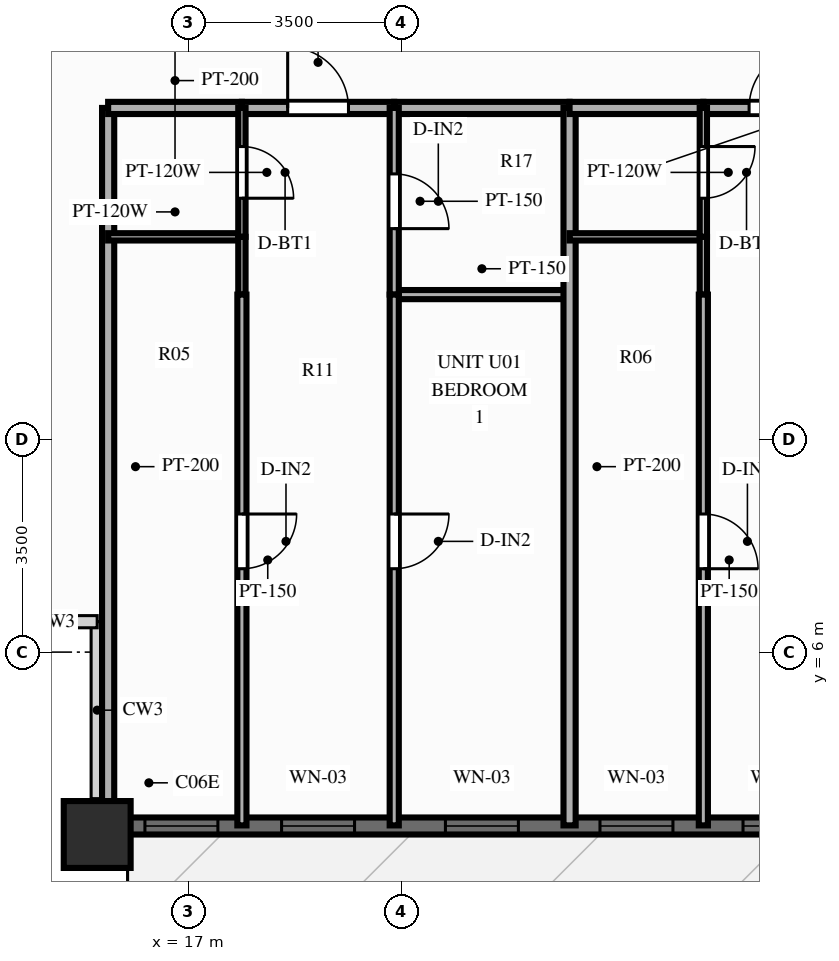
"""IFC4 building model, lengths in metres.
Left out: names, types, materials, properties, quantities, classifications, styles, units other than length and angle.
Written with IfcOpenShell. Run it as: python <this file> out.ifc"""

import sys

from ifc_helpers import new_model, si_unit, direction, frame, frame_2d, origin, origin_2d, place, context, subcontext, project, spatial, rectangle, extrude, source, transform, mapped, element, fill, save


model = new_model("IFC4")
c1 = context("Model", 3, precision=1e-05, world=origin(), true_north=direction((0.0, 1.0)))
c2 = subcontext(c1, "Body", "Model", "MODEL_VIEW")
j1 = project(units=[si_unit("LENGTHUNIT", "METRE"), si_unit("PLANEANGLEUNIT", "RADIAN")], contexts=[c1])
p1 = place(None, origin())
s1 = spatial("IfcSite", under=j1, at=p1, CompositionType="ELEMENT")
p2 = place(p1, origin())
s2 = spatial("IfcBuilding", under=s1, at=p2, CompositionType="ELEMENT")
p3 = place(p2, frame((0.0, 0.0, 25.4)))
s3 = spatial("IfcBuildingStorey", under=s2, at=p3, CompositionType="ELEMENT", Elevation=25.4)
m1 = source(origin(), c2, "Body", "SweptSolid", [
    extrude(rectangle(XDim=1.1, YDim=1.1, at=origin_2d()), origin(), (0.0, 0.0, 1.0), 3.0),
])
p4 = place(p3, frame((15.5, 3.0, 0.0), z_axis=(0.0, 0.0, 1.0), x_axis=(1.0, 0.0, 0.0)))
e1 = element("IfcColumn", 1, at=p4, inside=s3, PredefinedType="COLUMN", context=c2, shape_type="MappedRepresentation", body=[
    mapped(m1, transform((0.0, 0.0, 0.0), scale=1.0)),
])
p5 = place(p3, frame((15.5, 3.14, 0.0), z_axis=(0.0, 0.0, 1.0), x_axis=(1.0, 0.0, 0.0)))
e2 = element("IfcWall", 2, at=p5, inside=s3, PredefinedType="SOLIDWALL", context=c2, shape_type="SweptSolid", body=[
    extrude(rectangle(XDim=45.0, YDim=0.28, at=frame_2d((22.5, 0.0))), origin(), (0.0, 0.0, 1.0), 2.28),
])
p6 = place(p5, frame((0.785, 0.0, 0.25)))
e3 = element("IfcOpeningElement", 3, at=p6, cuts=e2, PredefinedType="OPENING", context=c2, shape_type="SweptSolid", body=[
    extrude(rectangle(XDim=1.2, YDim=1.5, at=frame_2d((0.6, 0.75))), frame((0.0, 0.152, 0.0), z_axis=(0.0, -1.0, 0.0), x_axis=(1.0, 0.0, 0.0)), (0.0, 0.0, 1.0), 0.304),
])
p7 = place(p5, frame((3.033, 0.0, 0.25)))
e4 = element("IfcOpeningElement", 4, at=p7, cuts=e2, PredefinedType="OPENING", context=c2, shape_type="SweptSolid", body=[
    extrude(rectangle(XDim=1.2, YDim=1.5, at=frame_2d((0.6, 0.75))), frame((0.0, 0.152, 0.0), z_axis=(0.0, -1.0, 0.0), x_axis=(1.0, 0.0, 0.0)), (0.0, 0.0, 1.0), 0.304),
])
p8 = place(p5, frame((5.727, 0.0, 0.25)))
e5 = element("IfcOpeningElement", 5, at=p8, cuts=e2, PredefinedType="OPENING", context=c2, shape_type="SweptSolid", body=[
    extrude(rectangle(XDim=1.2, YDim=1.5, at=frame_2d((0.6, 0.75))), frame((0.0, 0.152, 0.0), z_axis=(0.0, -1.0, 0.0), x_axis=(1.0, 0.0, 0.0)), (0.0, 0.0, 1.0), 0.304),
])
p9 = place(p5, frame((8.269, 0.0, 0.25)))
e6 = element("IfcOpeningElement", 6, at=p9, cuts=e2, PredefinedType="OPENING", context=c2, shape_type="SweptSolid", body=[
    extrude(rectangle(XDim=1.2, YDim=1.5, at=frame_2d((0.6, 0.75))), frame((0.0, 0.152, 0.0), z_axis=(0.0, -1.0, 0.0), x_axis=(1.0, 0.0, 0.0)), (0.0, 0.0, 1.0), 0.304),
])
p10 = place(p5, frame((10.621, 0.0, 0.25)))
e7 = element("IfcOpeningElement", 7, at=p10, cuts=e2, PredefinedType="OPENING", context=c2, shape_type="SweptSolid", body=[
    extrude(rectangle(XDim=1.2, YDim=1.5, at=frame_2d((0.6, 0.75))), frame((0.0, 0.152, 0.0), z_axis=(0.0, -1.0, 0.0), x_axis=(1.0, 0.0, 0.0)), (0.0, 0.0, 1.0), 0.304),
])
p11 = place(p5, frame((13.316, 0.0, 0.25)))
e8 = element("IfcOpeningElement", 8, at=p11, cuts=e2, PredefinedType="OPENING", context=c2, shape_type="SweptSolid", body=[
    extrude(rectangle(XDim=1.2, YDim=1.5, at=frame_2d((0.6, 0.75))), frame((0.0, 0.152, 0.0), z_axis=(0.0, -1.0, 0.0), x_axis=(1.0, 0.0, 0.0)), (0.0, 0.0, 1.0), 0.304),
])
p12 = place(p5, frame((16.624, 0.0, 0.25)))
e9 = element("IfcOpeningElement", 9, at=p12, cuts=e2, PredefinedType="OPENING", context=c2, shape_type="SweptSolid", body=[
    extrude(rectangle(XDim=0.7, YDim=1.5, at=frame_2d((0.35, 0.75))), frame((0.0, 0.152, 0.0), z_axis=(0.0, -1.0, 0.0), x_axis=(1.0, 0.0, 0.0)), (0.0, 0.0, 1.0), 0.304),
])
p13 = place(p5, frame((18.141, 0.0, 0.25)))
e10 = element("IfcOpeningElement", 10, at=p13, cuts=e2, PredefinedType="OPENING", context=c2, shape_type="SweptSolid", body=[
    extrude(rectangle(XDim=1.2, YDim=1.5, at=frame_2d((0.6, 0.75))), frame((0.0, 0.152, 0.0), z_axis=(0.0, -1.0, 0.0), x_axis=(1.0, 0.0, 0.0)), (0.0, 0.0, 1.0), 0.304),
])
p14 = place(p5, frame((21.874, 0.0, 0.0), z_axis=(0.0, 0.0, 1.0), x_axis=(-1.0, 0.0, 0.0)))
e11 = element("IfcOpeningElement", 11, at=p14, cuts=e2, PredefinedType="OPENING", context=c2, shape_type="SweptSolid", body=[
    extrude(rectangle(XDim=1.1, YDim=2.15, at=frame_2d((0.55, 1.075))), frame((0.0, 0.152, 0.0), z_axis=(0.0, -1.0, 0.0), x_axis=(1.0, 0.0, 0.0)), (0.0, 0.0, 1.0), 0.304),
])
p15 = place(p5, frame((23.223, 0.0, 0.25)))
e12 = element("IfcOpeningElement", 12, at=p15, cuts=e2, PredefinedType="OPENING", context=c2, shape_type="SweptSolid", body=[
    extrude(rectangle(XDim=1.2, YDim=1.5, at=frame_2d((0.6, 0.75))), frame((0.0, 0.152, 0.0), z_axis=(0.0, -1.0, 0.0), x_axis=(1.0, 0.0, 0.0)), (0.0, 0.0, 1.0), 0.304),
])
p16 = place(p5, frame((25.507, 0.0, 0.25)))
e13 = element("IfcOpeningElement", 13, at=p16, cuts=e2, PredefinedType="OPENING", context=c2, shape_type="SweptSolid", body=[
    extrude(rectangle(XDim=1.2, YDim=1.5, at=frame_2d((0.6, 0.75))), frame((0.0, 0.152, 0.0), z_axis=(0.0, -1.0, 0.0), x_axis=(1.0, 0.0, 0.0)), (0.0, 0.0, 1.0), 0.304),
])
p17 = place(p5, frame((27.6, 0.0, 0.25)))
e14 = element("IfcOpeningElement", 14, at=p17, cuts=e2, PredefinedType="OPENING", context=c2, shape_type="SweptSolid", body=[
    extrude(rectangle(XDim=0.7, YDim=1.5, at=frame_2d((0.35, 0.75))), frame((0.0, 0.152, 0.0), z_axis=(0.0, -1.0, 0.0), x_axis=(1.0, 0.0, 0.0)), (0.0, 0.0, 1.0), 0.304),
])
p18 = place(p5, frame((30.589, 0.0, 0.25)))
e15 = element("IfcOpeningElement", 15, at=p18, cuts=e2, PredefinedType="OPENING", context=c2, shape_type="SweptSolid", body=[
    extrude(rectangle(XDim=1.2, YDim=1.5, at=frame_2d((0.6, 0.75))), frame((0.0, 0.152, 0.0), z_axis=(0.0, -1.0, 0.0), x_axis=(1.0, 0.0, 0.0)), (0.0, 0.0, 1.0), 0.304),
])
p19 = place(p5, frame((32.872, 0.0, 0.25)))
e16 = element("IfcOpeningElement", 16, at=p19, cuts=e2, PredefinedType="OPENING", context=c2, shape_type="SweptSolid", body=[
    extrude(rectangle(XDim=1.2, YDim=1.5, at=frame_2d((0.6, 0.75))), frame((0.0, 0.152, 0.0), z_axis=(0.0, -1.0, 0.0), x_axis=(1.0, 0.0, 0.0)), (0.0, 0.0, 1.0), 0.304),
])
p20 = place(p5, frame((35.455, 0.0, 0.25)))
e17 = element("IfcOpeningElement", 17, at=p20, cuts=e2, PredefinedType="OPENING", context=c2, shape_type="SweptSolid", body=[
    extrude(rectangle(XDim=1.2, YDim=1.5, at=frame_2d((0.6, 0.75))), frame((0.0, 0.152, 0.0), z_axis=(0.0, -1.0, 0.0), x_axis=(1.0, 0.0, 0.0)), (0.0, 0.0, 1.0), 0.304),
])
p21 = place(p5, frame((37.954, 0.0, 0.25)))
e18 = element("IfcOpeningElement", 18, at=p21, cuts=e2, PredefinedType="OPENING", context=c2, shape_type="SweptSolid", body=[
    extrude(rectangle(XDim=1.2, YDim=1.5, at=frame_2d((0.6, 0.75))), frame((0.0, 0.152, 0.0), z_axis=(0.0, -1.0, 0.0), x_axis=(1.0, 0.0, 0.0)), (0.0, 0.0, 1.0), 0.304),
])
p22 = place(p5, frame((40.238, 0.0, 0.25)))
e19 = element("IfcOpeningElement", 19, at=p22, cuts=e2, PredefinedType="OPENING", context=c2, shape_type="SweptSolid", body=[
    extrude(rectangle(XDim=1.2, YDim=1.5, at=frame_2d((0.6, 0.75))), frame((0.0, 0.152, 0.0), z_axis=(0.0, -1.0, 0.0), x_axis=(1.0, 0.0, 0.0)), (0.0, 0.0, 1.0), 0.304),
])
p23 = place(p5, frame((42.716, 0.0, 0.25)))
e20 = element("IfcOpeningElement", 20, at=p23, cuts=e2, PredefinedType="OPENING", context=c2, shape_type="SweptSolid", body=[
    extrude(rectangle(XDim=1.2, YDim=1.5, at=frame_2d((0.6, 0.75))), frame((0.0, 0.152, 0.0), z_axis=(0.0, -1.0, 0.0), x_axis=(1.0, 0.0, 0.0)), (0.0, 0.0, 1.0), 0.304),
])
p24 = place(p3, frame((15.68, 14.95, 0.0), z_axis=(0.0, 0.0, 1.0), x_axis=(0.0, -1.0, 0.0)))
e21 = element("IfcWall", 21, at=p24, inside=s3, PredefinedType="PARTITIONING", context=c2, shape_type="SweptSolid", body=[
    extrude(rectangle(XDim=11.8, YDim=0.2, at=frame_2d((5.9, 0.0))), origin(), (0.0, 0.0, 1.0), 2.79),
])
p25 = place(p3, frame((15.68, 14.95, 0.0), z_axis=(0.0, 0.0, 1.0), x_axis=(1.0, 0.0, 0.0)))
e22 = element("IfcWall", 22, at=p25, inside=s3, PredefinedType="PARTITIONING", context=c2, shape_type="SweptSolid", body=[
    extrude(rectangle(XDim=2.2, YDim=0.2, at=frame_2d((1.1, 0.0))), origin(), (0.0, 0.0, 1.0), 2.79),
])
p26 = place(p3, frame((17.88, 14.95, 0.0), z_axis=(0.0, 0.0, 1.0), x_axis=(1.0, 0.0, 0.0)))
e23 = element("IfcWall", 23, at=p26, inside=s3, PredefinedType="PARTITIONING", context=c2, shape_type="SweptSolid", body=[
    extrude(rectangle(XDim=2.505, YDim=0.2, at=frame_2d((1.252, 0.0))), origin(), (0.0, 0.0, 1.0), 2.79),
])
p27 = place(p26, frame((0.753, 0.0, 0.0)))
e24 = element("IfcOpeningElement", 24, at=p27, cuts=e23, PredefinedType="OPENING", context=c2, shape_type="SweptSolid", body=[
    extrude(rectangle(XDim=1.0, YDim=2.15, at=frame_2d((0.5, 1.075))), frame((0.0, 0.112, 0.0), z_axis=(0.0, -1.0, 0.0), x_axis=(1.0, 0.0, 0.0)), (0.0, 0.0, 1.0), 0.224),
])
p28 = place(p3, frame((20.385, 14.95, 0.0), z_axis=(0.0, 0.0, 1.0), x_axis=(1.0, 0.0, 0.0)))
e25 = element("IfcWall", 25, at=p28, inside=s3, PredefinedType="PARTITIONING", context=c2, shape_type="SweptSolid", body=[
    extrude(rectangle(XDim=2.884, YDim=0.2, at=frame_2d((1.442, 0.0))), origin(), (0.0, 0.0, 1.0), 2.79),
])
p29 = place(p3, frame((15.68, 12.83, 0.0), z_axis=(0.0, 0.0, 1.0), x_axis=(1.0, 0.0, 0.0)))
e26 = element("IfcWall", 26, at=p29, inside=s3, PredefinedType="PARTITIONING", context=c2, shape_type="SweptSolid", body=[
    extrude(rectangle(XDim=2.2, YDim=0.12, at=frame_2d((1.1, 0.0))), origin(), (0.0, 0.0, 1.0), 2.79),
])
p30 = place(p3, frame((20.385, 11.88, 0.0), z_axis=(0.0, 0.0, 1.0), x_axis=(1.0, 0.0, 0.0)))
e27 = element("IfcWall", 27, at=p30, inside=s3, PredefinedType="PARTITIONING", context=c2, shape_type="SweptSolid", body=[
    extrude(rectangle(XDim=2.884, YDim=0.15, at=frame_2d((1.442, 0.0))), origin(), (0.0, 0.0, 1.0), 2.79),
])
p31 = place(p3, frame((17.88, 14.95, 0.0), z_axis=(0.0, 0.0, 1.0), x_axis=(0.0, -1.0, 0.0)))
e28 = element("IfcWall", 28, at=p31, inside=s3, PredefinedType="PARTITIONING", context=c2, shape_type="SweptSolid", body=[
    extrude(rectangle(XDim=2.12, YDim=0.12, at=frame_2d((1.06, 0.0))), origin(), (0.0, 0.0, 1.0), 2.79),
])
p32 = place(p31, frame((0.635, 0.0, 0.0)))
e29 = element("IfcOpeningElement", 29, at=p32, cuts=e28, PredefinedType="OPENING", context=c2, shape_type="SweptSolid", body=[
    extrude(rectangle(XDim=0.85, YDim=2.05, at=frame_2d((0.425, 1.025))), frame((0.0, 0.072, 0.0), z_axis=(0.0, -1.0, 0.0), x_axis=(1.0, 0.0, 0.0)), (0.0, 0.0, 1.0), 0.144),
])
p33 = place(p3, frame((17.88, 12.83, 0.0), z_axis=(0.0, 0.0, 1.0), x_axis=(0.0, -1.0, 0.0)))
e30 = element("IfcWall", 30, at=p33, inside=s3, PredefinedType="PARTITIONING", context=c2, shape_type="SweptSolid", body=[
    extrude(rectangle(XDim=0.95, YDim=0.12, at=frame_2d((0.475, 0.0))), origin(), (0.0, 0.0, 1.0), 2.79),
])
p34 = place(p3, frame((17.88, 11.88, 0.0), z_axis=(0.0, 0.0, 1.0), x_axis=(0.0, -1.0, 0.0)))
e31 = element("IfcWall", 31, at=p34, inside=s3, PredefinedType="PARTITIONING", context=c2, shape_type="SweptSolid", body=[
    extrude(rectangle(XDim=8.73, YDim=0.15, at=frame_2d((4.365, 0.0))), origin(), (0.0, 0.0, 1.0), 2.79),
])
p35 = place(p34, frame((3.609, 0.0, 0.0)))
e32 = element("IfcOpeningElement", 32, at=p35, cuts=e31, PredefinedType="OPENING", context=c2, shape_type="SweptSolid", body=[
    extrude(rectangle(XDim=0.9, YDim=2.1, at=frame_2d((0.45, 1.05))), frame((0.0, 0.087, 0.0), z_axis=(0.0, -1.0, 0.0), x_axis=(1.0, 0.0, 0.0)), (0.0, 0.0, 1.0), 0.174),
])
p36 = place(p3, frame((20.385, 14.95, 0.0), z_axis=(0.0, 0.0, 1.0), x_axis=(0.0, -1.0, 0.0)))
e33 = element("IfcWall", 33, at=p36, inside=s3, PredefinedType="PARTITIONING", context=c2, shape_type="SweptSolid", body=[
    extrude(rectangle(XDim=3.07, YDim=0.15, at=frame_2d((1.535, 0.0))), origin(), (0.0, 0.0, 1.0), 2.79),
])
p37 = place(p36, frame((1.085, 0.0, 0.0)))
e34 = element("IfcOpeningElement", 34, at=p37, cuts=e33, PredefinedType="OPENING", context=c2, shape_type="SweptSolid", body=[
    extrude(rectangle(XDim=0.9, YDim=2.1, at=frame_2d((0.45, 1.05))), frame((0.0, 0.087, 0.0), z_axis=(0.0, -1.0, 0.0), x_axis=(1.0, 0.0, 0.0)), (0.0, 0.0, 1.0), 0.174),
])
p38 = place(p3, frame((20.385, 11.88, 0.0), z_axis=(0.0, 0.0, 1.0), x_axis=(0.0, -1.0, 0.0)))
e35 = element("IfcWall", 35, at=p38, inside=s3, PredefinedType="PARTITIONING", context=c2, shape_type="SweptSolid", body=[
    extrude(rectangle(XDim=8.73, YDim=0.15, at=frame_2d((4.365, 0.0))), origin(), (0.0, 0.0, 1.0), 2.79),
])
p39 = place(p38, frame((3.609, 0.0, 0.0)))
e36 = element("IfcOpeningElement", 36, at=p39, cuts=e35, PredefinedType="OPENING", context=c2, shape_type="SweptSolid", body=[
    extrude(rectangle(XDim=0.9, YDim=2.1, at=frame_2d((0.45, 1.05))), frame((0.0, 0.087, 0.0), z_axis=(0.0, -1.0, 0.0), x_axis=(1.0, 0.0, 0.0)), (0.0, 0.0, 1.0), 0.174),
])
p40 = place(p3, frame((23.269, 14.95, 0.0), z_axis=(0.0, 0.0, 1.0), x_axis=(0.0, -1.0, 0.0)))
e37 = element("IfcWall", 37, at=p40, inside=s3, PredefinedType="PARTITIONING", context=c2, shape_type="SweptSolid", body=[
    extrude(rectangle(XDim=11.8, YDim=0.2, at=frame_2d((5.9, 0.0))), origin(), (0.0, 0.0, 1.0), 2.79),
])
p41 = place(p3, frame((23.269, 14.95, 0.0), z_axis=(0.0, 0.0, 1.0), x_axis=(1.0, 0.0, 0.0)))
e38 = element("IfcWall", 38, at=p41, inside=s3, PredefinedType="PARTITIONING", context=c2, shape_type="SweptSolid", body=[
    extrude(rectangle(XDim=2.2, YDim=0.2, at=frame_2d((1.1, 0.0))), origin(), (0.0, 0.0, 1.0), 2.79),
])
p42 = place(p3, frame((25.469, 14.95, 0.0), z_axis=(0.0, 0.0, 1.0), x_axis=(1.0, 0.0, 0.0)))
e39 = element("IfcWall", 39, at=p42, inside=s3, PredefinedType="PARTITIONING", context=c2, shape_type="SweptSolid", body=[
    extrude(rectangle(XDim=2.505, YDim=0.2, at=frame_2d((1.252, 0.0))), origin(), (0.0, 0.0, 1.0), 2.79),
])
p43 = place(p42, frame((0.752, 0.0, 0.0)))
e40 = element("IfcOpeningElement", 40, at=p43, cuts=e39, PredefinedType="OPENING", context=c2, shape_type="SweptSolid", body=[
    extrude(rectangle(XDim=1.0, YDim=2.15, at=frame_2d((0.5, 1.075))), frame((0.0, 0.112, 0.0), z_axis=(0.0, -1.0, 0.0), x_axis=(1.0, 0.0, 0.0)), (0.0, 0.0, 1.0), 0.224),
])
p44 = place(p3, frame((23.269, 12.83, 0.0), z_axis=(0.0, 0.0, 1.0), x_axis=(1.0, 0.0, 0.0)))
e41 = element("IfcWall", 41, at=p44, inside=s3, PredefinedType="PARTITIONING", context=c2, shape_type="SweptSolid", body=[
    extrude(rectangle(XDim=2.2, YDim=0.12, at=frame_2d((1.1, 0.0))), origin(), (0.0, 0.0, 1.0), 2.79),
])
p45 = place(p3, frame((25.469, 14.95, 0.0), z_axis=(0.0, 0.0, 1.0), x_axis=(0.0, -1.0, 0.0)))
e42 = element("IfcWall", 42, at=p45, inside=s3, PredefinedType="PARTITIONING", context=c2, shape_type="SweptSolid", body=[
    extrude(rectangle(XDim=2.12, YDim=0.12, at=frame_2d((1.06, 0.0))), origin(), (0.0, 0.0, 1.0), 2.79),
])
p46 = place(p45, frame((0.635, 0.0, 0.0)))
e43 = element("IfcOpeningElement", 43, at=p46, cuts=e42, PredefinedType="OPENING", context=c2, shape_type="SweptSolid", body=[
    extrude(rectangle(XDim=0.85, YDim=2.05, at=frame_2d((0.425, 1.025))), frame((0.0, 0.072, 0.0), z_axis=(0.0, -1.0, 0.0), x_axis=(1.0, 0.0, 0.0)), (0.0, 0.0, 1.0), 0.144),
])
p47 = place(p3, frame((25.469, 12.83, 0.0), z_axis=(0.0, 0.0, 1.0), x_axis=(0.0, -1.0, 0.0)))
e44 = element("IfcWall", 44, at=p47, inside=s3, PredefinedType="PARTITIONING", context=c2, shape_type="SweptSolid", body=[
    extrude(rectangle(XDim=0.95, YDim=0.12, at=frame_2d((0.475, 0.0))), origin(), (0.0, 0.0, 1.0), 2.79),
])
p48 = place(p3, frame((25.469, 11.88, 0.0), z_axis=(0.0, 0.0, 1.0), x_axis=(0.0, -1.0, 0.0)))
e45 = element("IfcWall", 45, at=p48, inside=s3, PredefinedType="PARTITIONING", context=c2, shape_type="SweptSolid", body=[
    extrude(rectangle(XDim=8.73, YDim=0.15, at=frame_2d((4.365, 0.0))), origin(), (0.0, 0.0, 1.0), 2.79),
])
p49 = place(p48, frame((3.609, 0.0, 0.0)))
e46 = element("IfcOpeningElement", 46, at=p49, cuts=e45, PredefinedType="OPENING", context=c2, shape_type="SweptSolid", body=[
    extrude(rectangle(XDim=0.9, YDim=2.1, at=frame_2d((0.45, 1.05))), frame((0.0, 0.087, 0.0), z_axis=(0.0, -1.0, 0.0), x_axis=(1.0, 0.0, 0.0)), (0.0, 0.0, 1.0), 0.174),
])
m2 = source(origin(), c2, "Body", "SweptSolid", [
    extrude(rectangle(XDim=1.2, YDim=1.5, at=frame_2d((0.6, 0.75))), frame((0.0, 0.03, 0.0), z_axis=(0.0, -1.0, 0.0), x_axis=(1.0, 0.0, 0.0)), (0.0, 0.0, 1.0), 0.06),
])
p50 = place(p6, origin())
e47 = element("IfcWindow", 47, at=p50, inside=s3, PartitioningType="SINGLE_PANEL", PredefinedType="WINDOW", context=c2, shape_type="MappedRepresentation", body=[
    mapped(m2, transform((0.0, 0.0, 0.0), scale=1.0)),
])
fill(e3, e47)
p51 = place(p7, origin())
e48 = element("IfcWindow", 48, at=p51, inside=s3, PartitioningType="SINGLE_PANEL", PredefinedType="WINDOW", context=c2, shape_type="MappedRepresentation", body=[
    mapped(m2, transform((0.0, 0.0, 0.0), scale=1.0)),
])
fill(e4, e48)
p52 = place(p8, origin())
e49 = element("IfcWindow", 49, at=p52, inside=s3, PartitioningType="SINGLE_PANEL", PredefinedType="WINDOW", context=c2, shape_type="MappedRepresentation", body=[
    mapped(m2, transform((0.0, 0.0, 0.0), scale=1.0)),
])
fill(e5, e49)
p53 = place(p9, origin())
e50 = element("IfcWindow", 50, at=p53, inside=s3, PartitioningType="SINGLE_PANEL", PredefinedType="WINDOW", context=c2, shape_type="MappedRepresentation", body=[
    mapped(m2, transform((0.0, 0.0, 0.0), scale=1.0)),
])
fill(e6, e50)
p54 = place(p10, origin())
e51 = element("IfcWindow", 51, at=p54, inside=s3, PartitioningType="SINGLE_PANEL", PredefinedType="WINDOW", context=c2, shape_type="MappedRepresentation", body=[
    mapped(m2, transform((0.0, 0.0, 0.0), scale=1.0)),
])
fill(e7, e51)
m3 = source(origin(), c2, "Body", "SweptSolid", [
    extrude(rectangle(XDim=1.0, YDim=2.15, at=frame_2d((0.5, 1.075))), frame((0.0, 0.025, 0.0), z_axis=(0.0, -1.0, 0.0), x_axis=(1.0, 0.0, 0.0)), (0.0, 0.0, 1.0), 0.05),
])
p55 = place(p27, origin())
e52 = element("IfcDoor", 52, at=p55, inside=s3, OperationType="SINGLE_SWING_LEFT", PredefinedType="DOOR", context=c2, shape_type="MappedRepresentation", body=[
    mapped(m3, transform((0.0, 0.0, 0.0), scale=1.0)),
])
fill(e24, e52)
m4 = source(origin(), c2, "Body", "SweptSolid", [
    extrude(rectangle(XDim=0.85, YDim=2.05, at=frame_2d((0.425, 1.025))), frame((0.0, 0.025, 0.0), z_axis=(0.0, -1.0, 0.0), x_axis=(1.0, 0.0, 0.0)), (0.0, 0.0, 1.0), 0.05),
])
p56 = place(p32, origin())
e53 = element("IfcDoor", 53, at=p56, inside=s3, OperationType="SINGLE_SWING_RIGHT", PredefinedType="DOOR", context=c2, shape_type="MappedRepresentation", body=[
    mapped(m4, transform((0.0, 0.0, 0.0), scale=1.0)),
])
fill(e29, e53)
m5 = source(origin(), c2, "Body", "SweptSolid", [
    extrude(rectangle(XDim=0.9, YDim=2.1, at=frame_2d((0.45, 1.05))), frame((0.0, 0.025, 0.0), z_axis=(0.0, -1.0, 0.0), x_axis=(1.0, 0.0, 0.0)), (0.0, 0.0, 1.0), 0.05),
])
p57 = place(p35, origin())
e54 = element("IfcDoor", 54, at=p57, inside=s3, OperationType="SINGLE_SWING_LEFT", PredefinedType="DOOR", context=c2, shape_type="MappedRepresentation", body=[
    mapped(m5, transform((0.0, 0.0, 0.0), scale=1.0)),
])
fill(e32, e54)
p58 = place(p37, origin())
e55 = element("IfcDoor", 55, at=p58, inside=s3, OperationType="SINGLE_SWING_RIGHT", PredefinedType="DOOR", context=c2, shape_type="MappedRepresentation", body=[
    mapped(m5, transform((0.0, 0.0, 0.0), scale=1.0)),
])
fill(e34, e55)
p59 = place(p39, origin())
e56 = element("IfcDoor", 56, at=p59, inside=s3, OperationType="SINGLE_SWING_LEFT", PredefinedType="DOOR", context=c2, shape_type="MappedRepresentation", body=[
    mapped(m5, transform((0.0, 0.0, 0.0), scale=1.0)),
])
fill(e36, e56)
p60 = place(p43, origin())
e57 = element("IfcDoor", 57, at=p60, inside=s3, OperationType="SINGLE_SWING_RIGHT", PredefinedType="DOOR", context=c2, shape_type="MappedRepresentation", body=[
    mapped(m3, transform((0.0, 0.0, 0.0), scale=1.0)),
])
fill(e40, e57)
p61 = place(p46, origin())
e58 = element("IfcDoor", 58, at=p61, inside=s3, OperationType="SINGLE_SWING_LEFT", PredefinedType="DOOR", context=c2, shape_type="MappedRepresentation", body=[
    mapped(m4, transform((0.0, 0.0, 0.0), scale=1.0)),
])
fill(e43, e58)
p62 = place(p49, origin())
e59 = element("IfcDoor", 59, at=p62, inside=s3, OperationType="SINGLE_SWING_RIGHT", PredefinedType="DOOR", context=c2, shape_type="MappedRepresentation", body=[
    mapped(m5, transform((0.0, 0.0, 0.0), scale=1.0)),
])
fill(e46, e59)
save(model, sys.argv[1])
